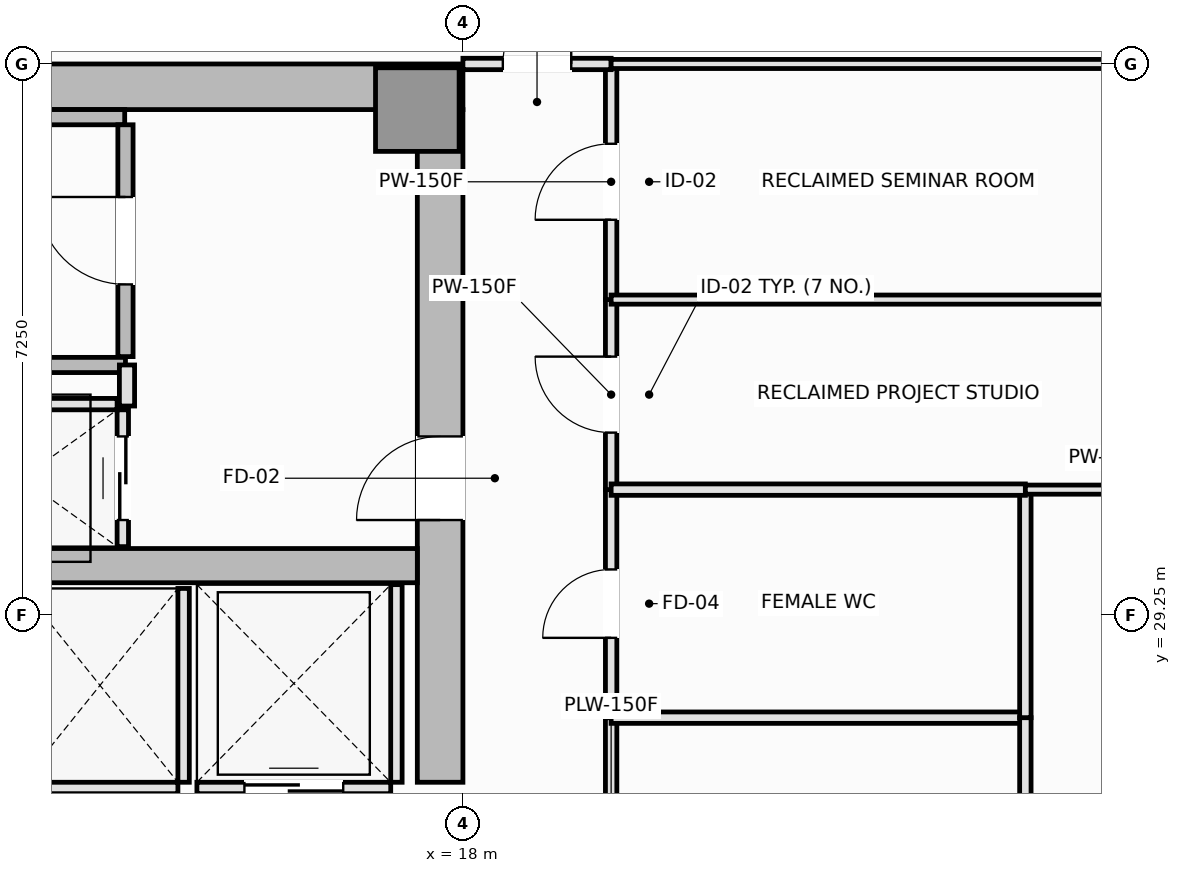
"""IFC4 building model, lengths in metres.
Left out: names, types, materials, properties, quantities, classifications, styles, units other than length and angle.
Written with IfcOpenShell. Run it as: python <this file> out.ifc"""

import sys

from ifc_helpers import new_model, si_unit, direction, frame, frame_2d, origin, origin_2d, place, context, subcontext, project, spatial, rectangle, extrude, element, fill, save


model = new_model("IFC4")
c1 = context("Model", 3, precision=1e-05, world=origin(), true_north=direction((0.0, 1.0)))
c2 = subcontext(c1, "Body", "Model", "MODEL_VIEW")
j1 = project(units=[si_unit("LENGTHUNIT", "METRE"), si_unit("PLANEANGLEUNIT", "RADIAN")], contexts=[c1])
p1 = place(None, origin())
s1 = spatial("IfcSite", under=j1, at=p1, CompositionType="ELEMENT")
p2 = place(p1, origin())
s2 = spatial("IfcBuilding", under=s1, at=p2, CompositionType="ELEMENT")
p3 = place(p2, frame((0.0, 0.0, 105.8)))
s3 = spatial("IfcBuildingStorey", under=s2, at=p3, CompositionType="ELEMENT", Elevation=105.8)
p4 = place(p3, frame((4.5, 36.2, 0.0), z_axis=(0.0, 0.0, 1.0), x_axis=(1.0, 0.0, 0.0)))
e1 = element("IfcWall", 1, at=p4, inside=s3, PredefinedType="SHEAR", context=c2, shape_type="SweptSolid", body=[
    extrude(rectangle(XDim=13.5, YDim=0.6, at=frame_2d((6.75, 0.0))), origin(), (0.0, 0.0, 1.0), 3.55),
])
p5 = place(p3, frame((17.7, 27.05, 0.0), z_axis=(0.0, 0.0, 1.0), x_axis=(0.0, 1.0, 0.0)))
e2 = element("IfcWall", 2, at=p5, inside=s3, PredefinedType="SHEAR", context=c2, shape_type="SweptSolid", body=[
    extrude(rectangle(XDim=8.85, YDim=0.6, at=frame_2d((4.425, 0.0))), origin(), (0.0, 0.0, 1.0), 3.55),
])
p6 = place(p5, frame((3.45, 0.0, 0.0)))
e3 = element("IfcOpeningElement", 3, at=p6, cuts=e2, PredefinedType="OPENING", context=c2, shape_type="SweptSolid", body=[
    extrude(rectangle(XDim=1.1, YDim=2.15, at=frame_2d((0.55, 1.075))), frame((0.0, 0.31, 0.0), z_axis=(0.0, -1.0, 0.0), x_axis=(1.0, 0.0, 0.0)), (0.0, 0.0, 1.0), 0.62),
])
p7 = place(p3, frame((5.1, 29.9, 0.0), z_axis=(0.0, 0.0, 1.0), x_axis=(1.0, 0.0, 0.0)))
e4 = element("IfcWall", 4, at=p7, inside=s3, PredefinedType="SHEAR", context=c2, shape_type="SweptSolid", body=[
    extrude(rectangle(XDim=12.3, YDim=0.45, at=frame_2d((6.15, 0.0))), origin(), (0.0, 0.0, 1.0), 3.55),
])
p8 = place(p3, frame((17.4, 35.9, 0.0), z_axis=(0.0, 0.0, 1.0), x_axis=(1.0, 0.0, 0.0)))
e5 = element("IfcColumn", 5, at=p8, inside=s3, PredefinedType="PILASTER", context=c2, shape_type="SweptSolid", body=[
    extrude(rectangle(XDim=1.1, YDim=1.1, at=origin_2d()), origin(), (0.0, 0.0, 1.0), 3.55),
])
p9 = place(p3, frame((5.8, 35.8, 0.0), z_axis=(0.0, 0.0, 1.0), x_axis=(1.0, 0.0, 0.0)))
e6 = element("IfcWall", 6, at=p9, inside=s3, PredefinedType="SOLIDWALL", context=c2, shape_type="SweptSolid", body=[
    extrude(rectangle(XDim=7.75, YDim=0.2, at=frame_2d((3.875, 0.0))), origin(), (0.0, 0.0, 1.0), 3.55),
])
p10 = place(p3, frame((5.9, 32.54, 0.0), z_axis=(0.0, 0.0, 1.0), x_axis=(1.0, 0.0, 0.0)))
e7 = element("IfcWall", 7, at=p10, inside=s3, PredefinedType="SOLIDWALL", context=c2, shape_type="SweptSolid", body=[
    extrude(rectangle(XDim=7.66, YDim=0.2, at=frame_2d((3.83, 0.0))), origin(), (0.0, 0.0, 1.0), 3.55),
])
p11 = place(p3, frame((13.56, 32.65, 0.0), z_axis=(0.0, 0.0, 1.0), x_axis=(0.0, 1.0, 0.0)))
e8 = element("IfcWall", 8, at=p11, inside=s3, PredefinedType="SOLIDWALL", context=c2, shape_type="SweptSolid", body=[
    extrude(rectangle(XDim=3.05, YDim=0.2, at=frame_2d((1.525, 0.0))), origin(), (0.0, 0.0, 1.0), 3.55),
])
p12 = place(p11, frame((0.95, 0.0, 0.0)))
e9 = element("IfcOpeningElement", 9, at=p12, cuts=e8, PredefinedType="OPENING", context=c2, shape_type="SweptSolid", body=[
    extrude(rectangle(XDim=1.15, YDim=2.15, at=frame_2d((0.575, 1.075))), frame((0.0, 0.11, 0.0), z_axis=(0.0, -1.0, 0.0), x_axis=(1.0, 0.0, 0.0)), (0.0, 0.0, 1.0), 0.22),
])
p13 = place(p3, frame((12.2, 26.975, 0.0), z_axis=(0.0, 0.0, 1.0), x_axis=(1.0, 0.0, 0.0)))
e10 = element("IfcWall", 10, at=p13, inside=s3, PredefinedType="PARTITIONING", context=c2, shape_type="SweptSolid", body=[
    extrude(rectangle(XDim=2.05, YDim=0.15, at=frame_2d((1.025, 0.0))), origin(), (0.0, 0.0, 1.0), 3.37),
])
p14 = place(p3, frame((14.325, 27.05, 0.0), z_axis=(0.0, 0.0, 1.0), x_axis=(0.0, 1.0, 0.0)))
e11 = element("IfcWall", 11, at=p14, inside=s3, PredefinedType="PARTITIONING", context=c2, shape_type="SweptSolid", body=[
    extrude(rectangle(XDim=2.55, YDim=0.15, at=frame_2d((1.275, 0.0))), origin(), (0.0, 0.0, 1.0), 3.37),
])
p15 = place(p3, frame((14.5, 26.975, 0.0), z_axis=(0.0, 0.0, 1.0), x_axis=(1.0, 0.0, 0.0)))
e12 = element("IfcWall", 12, at=p15, inside=s3, PredefinedType="PARTITIONING", context=c2, shape_type="SweptSolid", body=[
    extrude(rectangle(XDim=2.55, YDim=0.15, at=frame_2d((1.275, 0.0))), origin(), (0.0, 0.0, 1.0), 3.37),
])
p16 = place(p15, frame((0.625, 0.0, 0.0)))
e13 = element("IfcOpeningElement", 13, at=p16, cuts=e12, PredefinedType="OPENING", context=c2, shape_type="SweptSolid", body=[
    extrude(rectangle(XDim=1.3, YDim=2.2, at=frame_2d((0.65, 1.1))), frame((0.0, 0.085, 0.0), z_axis=(0.0, -1.0, 0.0), x_axis=(1.0, 0.0, 0.0)), (0.0, 0.0, 1.0), 0.17),
])
p17 = place(p3, frame((17.125, 27.05, 0.0), z_axis=(0.0, 0.0, 1.0), x_axis=(0.0, 1.0, 0.0)))
e14 = element("IfcWall", 14, at=p17, inside=s3, PredefinedType="PARTITIONING", context=c2, shape_type="SweptSolid", body=[
    extrude(rectangle(XDim=2.6, YDim=0.15, at=frame_2d((1.3, 0.0))), origin(), (0.0, 0.0, 1.0), 3.37),
])
p18 = place(p3, frame((10.95, 32.025, 0.0), z_axis=(0.0, 0.0, 1.0), x_axis=(1.0, 0.0, 0.0)))
e15 = element("IfcWall", 15, at=p18, inside=s3, PredefinedType="PARTITIONING", context=c2, shape_type="SweptSolid", body=[
    extrude(rectangle(XDim=2.5, YDim=0.15, at=frame_2d((1.25, 0.0))), origin(), (0.0, 0.0, 1.0), 3.37),
])
p19 = place(p3, frame((13.525, 30.15, 0.0), z_axis=(0.0, 0.0, 1.0), x_axis=(0.0, 1.0, 0.0)))
e16 = element("IfcWall", 16, at=p19, inside=s3, PredefinedType="PARTITIONING", context=c2, shape_type="SweptSolid", body=[
    extrude(rectangle(XDim=1.8, YDim=0.15, at=frame_2d((0.9, 0.0))), origin(), (0.0, 0.0, 1.0), 3.37),
])
p20 = place(p19, frame((0.35, 0.0, 0.0)))
e17 = element("IfcOpeningElement", 17, at=p20, cuts=e16, PredefinedType="OPENING", context=c2, shape_type="SweptSolid", body=[
    extrude(rectangle(XDim=1.1, YDim=2.2, at=frame_2d((0.55, 1.1))), frame((0.0, 0.085, 0.0), z_axis=(0.0, -1.0, 0.0), x_axis=(1.0, 0.0, 0.0)), (0.0, 0.0, 1.0), 0.17),
])
p21 = place(p3, frame((13.58, 32.0, 0.0), z_axis=(0.0, 0.0, 1.0), x_axis=(0.0, 1.0, 0.0)))
e18 = element("IfcWall", 18, at=p21, inside=s3, PredefinedType="PARTITIONING", context=c2, shape_type="SweptSolid", body=[
    extrude(rectangle(XDim=0.54, YDim=0.2, at=frame_2d((0.27, 0.0))), origin(), (0.0, 0.0, 1.0), 3.37),
])
p22 = place(p3, frame((19.95, 24.9, 0.0), z_axis=(0.0, 0.0, 1.0), x_axis=(0.0, 1.0, 0.0)))
e19 = element("IfcWall", 19, at=p22, inside=s3, PredefinedType="PLUMBINGWALL", context=c2, shape_type="SweptSolid", body=[
    extrude(rectangle(XDim=3.0, YDim=0.15, at=frame_2d((1.5, 0.0))), origin(), (0.0, 0.0, 1.0), 3.37),
])
p23 = place(p22, frame((1.05, 0.0, 0.0)))
e20 = element("IfcOpeningElement", 20, at=p23, cuts=e19, PredefinedType="OPENING", context=c2, shape_type="SweptSolid", body=[
    extrude(rectangle(XDim=0.9, YDim=2.1, at=frame_2d((0.45, 1.05))), frame((0.0, 0.085, 0.0), z_axis=(0.0, -1.0, 0.0), x_axis=(1.0, 0.0, 0.0)), (0.0, 0.0, 1.0), 0.17),
])
p24 = place(p3, frame((19.95, 27.9, 0.0), z_axis=(0.0, 0.0, 1.0), x_axis=(0.0, 1.0, 0.0)))
e21 = element("IfcWall", 21, at=p24, inside=s3, PredefinedType="PLUMBINGWALL", context=c2, shape_type="SweptSolid", body=[
    extrude(rectangle(XDim=3.0, YDim=0.15, at=frame_2d((1.5, 0.0))), origin(), (0.0, 0.0, 1.0), 3.37),
])
p25 = place(p24, frame((1.05, 0.0, 0.0)))
e22 = element("IfcOpeningElement", 22, at=p25, cuts=e21, PredefinedType="OPENING", context=c2, shape_type="SweptSolid", body=[
    extrude(rectangle(XDim=0.9, YDim=2.1, at=frame_2d((0.45, 1.05))), frame((0.0, 0.085, 0.0), z_axis=(0.0, -1.0, 0.0), x_axis=(1.0, 0.0, 0.0)), (0.0, 0.0, 1.0), 0.17),
])
p26 = place(p3, frame((19.95, 30.9, 0.0), z_axis=(0.0, 0.0, 1.0), x_axis=(0.0, 1.0, 0.0)))
e23 = element("IfcWall", 23, at=p26, inside=s3, PredefinedType="PARTITIONING", context=c2, shape_type="SweptSolid", body=[
    extrude(rectangle(XDim=2.5, YDim=0.15, at=frame_2d((1.25, 0.0))), origin(), (0.0, 0.0, 1.0), 3.37),
])
p27 = place(p26, frame((0.75, 0.0, 0.0)))
e24 = element("IfcOpeningElement", 24, at=p27, cuts=e23, PredefinedType="OPENING", context=c2, shape_type="SweptSolid", body=[
    extrude(rectangle(XDim=1.0, YDim=2.15, at=frame_2d((0.5, 1.075))), frame((0.0, 0.085, 0.0), z_axis=(0.0, -1.0, 0.0), x_axis=(1.0, 0.0, 0.0)), (0.0, 0.0, 1.0), 0.17),
])
p28 = place(p3, frame((19.95, 33.4, 0.0), z_axis=(0.0, 0.0, 1.0), x_axis=(0.0, 1.0, 0.0)))
e25 = element("IfcWall", 25, at=p28, inside=s3, PredefinedType="PARTITIONING", context=c2, shape_type="SweptSolid", body=[
    extrude(rectangle(XDim=3.1, YDim=0.15, at=frame_2d((1.55, 0.0))), origin(), (0.0, 0.0, 1.0), 3.37),
])
p29 = place(p28, frame((1.05, 0.0, 0.0)))
e26 = element("IfcOpeningElement", 26, at=p29, cuts=e25, PredefinedType="OPENING", context=c2, shape_type="SweptSolid", body=[
    extrude(rectangle(XDim=1.0, YDim=2.15, at=frame_2d((0.5, 1.075))), frame((0.0, 0.085, 0.0), z_axis=(0.0, -1.0, 0.0), x_axis=(1.0, 0.0, 0.0)), (0.0, 0.0, 1.0), 0.17),
])
p30 = place(p3, frame((18.0, 36.5, 0.0), z_axis=(0.0, 0.0, 1.0), x_axis=(1.0, 0.0, 0.0)))
e27 = element("IfcWall", 27, at=p30, inside=s3, PredefinedType="PARTITIONING", context=c2, shape_type="SweptSolid", body=[
    extrude(rectangle(XDim=1.95, YDim=0.15, at=frame_2d((0.975, 0.0))), origin(), (0.0, 0.0, 1.0), 3.37),
])
p31 = place(p30, frame((0.525, 0.0, 0.0)))
e28 = element("IfcOpeningElement", 28, at=p31, cuts=e27, PredefinedType="OPENING", context=c2, shape_type="SweptSolid", body=[
    extrude(rectangle(XDim=0.9, YDim=2.1, at=frame_2d((0.45, 1.05))), frame((0.0, 0.085, 0.0), z_axis=(0.0, -1.0, 0.0), x_axis=(1.0, 0.0, 0.0)), (0.0, 0.0, 1.0), 0.17),
])
p32 = place(p3, frame((19.95, 27.9, 0.0), z_axis=(0.0, 0.0, 1.0), x_axis=(1.0, 0.0, 0.0)))
e29 = element("IfcWall", 29, at=p32, inside=s3, PredefinedType="PLUMBINGWALL", context=c2, shape_type="SweptSolid", body=[
    extrude(rectangle(XDim=5.45, YDim=0.15, at=frame_2d((2.725, 0.0))), origin(), (0.0, 0.0, 1.0), 3.37),
])
for number, where, z_axis, x_axis in (
    (30, (25.4, 24.9, 0.0), (0.0, 0.0, 1.0), (0.0, 1.0, 0.0)),
    (31, (25.4, 27.9, 0.0), (0.0, 0.0, 1.0), (0.0, 1.0, 0.0)),
):
    element("IfcWall", number, at=place(p3, frame(where, z_axis=z_axis, x_axis=x_axis)), inside=s3, PredefinedType="PLUMBINGWALL", context=c2, shape_type="SweptSolid", body=[
        extrude(rectangle(XDim=3.0, YDim=0.15, at=frame_2d((1.5, 0.0))), origin(), (0.0, 0.0, 1.0), 3.37),
    ])
p33 = place(p3, frame((19.95, 30.9, 0.0), z_axis=(0.0, 0.0, 1.0), x_axis=(1.0, 0.0, 0.0)))
e32 = element("IfcWall", 32, at=p33, inside=s3, PredefinedType="PLUMBINGWALL", context=c2, shape_type="SweptSolid", body=[
    extrude(rectangle(XDim=5.45, YDim=0.15, at=frame_2d((2.725, 0.0))), origin(), (0.0, 0.0, 1.0), 3.37),
])
p34 = place(p3, frame((25.4, 30.9, 0.0), z_axis=(0.0, 0.0, 1.0), x_axis=(1.0, 0.0, 0.0)))
e33 = element("IfcWall", 33, at=p34, inside=s3, PredefinedType="PARTITIONING", context=c2, shape_type="SweptSolid", body=[
    extrude(rectangle(XDim=2.1, YDim=0.12, at=frame_2d((1.05, 0.0))), origin(), (0.0, 0.0, 1.0), 3.37),
])
for number, where, z_axis, x_axis in (
    (34, (19.95, 33.4, 0.0), (0.0, 0.0, 1.0), (1.0, 0.0, 0.0)),
    (35, (19.95, 36.5, 0.0), (0.0, 0.0, 1.0), (1.0, 0.0, 0.0)),
):
    element("IfcWall", number, at=place(p3, frame(where, z_axis=z_axis, x_axis=x_axis)), inside=s3, PredefinedType="PARTITIONING", context=c2, shape_type="SweptSolid", body=[
        extrude(rectangle(XDim=7.55, YDim=0.12, at=frame_2d((3.775, 0.0))), origin(), (0.0, 0.0, 1.0), 3.37),
    ])
p35 = place(p12, origin())
e36 = element("IfcDoor", 36, at=p35, inside=s3, OperationType="SINGLE_SWING_RIGHT", PredefinedType="DOOR", context=c2, shape_type="SweptSolid", body=[
    extrude(rectangle(XDim=1.15, YDim=2.15, at=frame_2d((0.575, 1.075))), frame((0.0, 0.025, 0.0), z_axis=(0.0, -1.0, 0.0), x_axis=(1.0, 0.0, 0.0)), (0.0, 0.0, 1.0), 0.05),
])
fill(e9, e36)
p36 = place(p16, origin())
e37 = element("IfcDoor", 37, at=p36, inside=s3, OperationType="DOUBLE_DOOR_SLIDING", PredefinedType="DOOR", context=c2, shape_type="SweptSolid", body=[
    extrude(rectangle(XDim=1.3, YDim=2.2, at=frame_2d((0.65, 1.1))), frame((0.0, 0.025, 0.0), z_axis=(0.0, -1.0, 0.0), x_axis=(1.0, 0.0, 0.0)), (0.0, 0.0, 1.0), 0.05),
])
fill(e13, e37)
p37 = place(p20, origin())
e38 = element("IfcDoor", 38, at=p37, inside=s3, OperationType="DOUBLE_DOOR_SLIDING", PredefinedType="DOOR", context=c2, shape_type="SweptSolid", body=[
    extrude(rectangle(XDim=1.1, YDim=2.2, at=frame_2d((0.55, 1.1))), frame((0.0, 0.025, 0.0), z_axis=(0.0, -1.0, 0.0), x_axis=(1.0, 0.0, 0.0)), (0.0, 0.0, 1.0), 0.05),
])
fill(e17, e38)
p38 = place(p6, origin())
e39 = element("IfcDoor", 39, at=p38, inside=s3, OperationType="SINGLE_SWING_LEFT", PredefinedType="DOOR", context=c2, shape_type="SweptSolid", body=[
    extrude(rectangle(XDim=1.1, YDim=2.15, at=frame_2d((0.55, 1.075))), frame((0.0, 0.025, 0.0), z_axis=(0.0, -1.0, 0.0), x_axis=(1.0, 0.0, 0.0)), (0.0, 0.0, 1.0), 0.05),
])
fill(e3, e39)
p39 = place(p25, origin())
e40 = element("IfcDoor", 40, at=p39, inside=s3, OperationType="SINGLE_SWING_LEFT", PredefinedType="DOOR", context=c2, shape_type="SweptSolid", body=[
    extrude(rectangle(XDim=0.9, YDim=2.1, at=frame_2d((0.45, 1.05))), frame((0.0, 0.025, 0.0), z_axis=(0.0, -1.0, 0.0), x_axis=(1.0, 0.0, 0.0)), (0.0, 0.0, 1.0), 0.05),
])
fill(e22, e40)
p40 = place(p27, origin())
e41 = element("IfcDoor", 41, at=p40, inside=s3, OperationType="SINGLE_SWING_RIGHT", PredefinedType="DOOR", context=c2, shape_type="SweptSolid", body=[
    extrude(rectangle(XDim=1.0, YDim=2.15, at=frame_2d((0.5, 1.075))), frame((0.0, 0.025, 0.0), z_axis=(0.0, -1.0, 0.0), x_axis=(1.0, 0.0, 0.0)), (0.0, 0.0, 1.0), 0.05),
])
fill(e24, e41)
p41 = place(p29, origin())
e42 = element("IfcDoor", 42, at=p41, inside=s3, OperationType="SINGLE_SWING_LEFT", PredefinedType="DOOR", context=c2, shape_type="SweptSolid", body=[
    extrude(rectangle(XDim=1.0, YDim=2.15, at=frame_2d((0.5, 1.075))), frame((0.0, 0.025, 0.0), z_axis=(0.0, -1.0, 0.0), x_axis=(1.0, 0.0, 0.0)), (0.0, 0.0, 1.0), 0.05),
])
fill(e26, e42)
p42 = place(p31, origin())
e43 = element("IfcDoor", 43, at=p42, inside=s3, OperationType="SINGLE_SWING_RIGHT", PredefinedType="DOOR", context=c2, shape_type="SweptSolid", body=[
    extrude(rectangle(XDim=0.9, YDim=2.1, at=frame_2d((0.45, 1.05))), frame((0.0, 0.025, 0.0), z_axis=(0.0, -1.0, 0.0), x_axis=(1.0, 0.0, 0.0)), (0.0, 0.0, 1.0), 0.05),
])
fill(e28, e43)
save(model, sys.argv[1])
